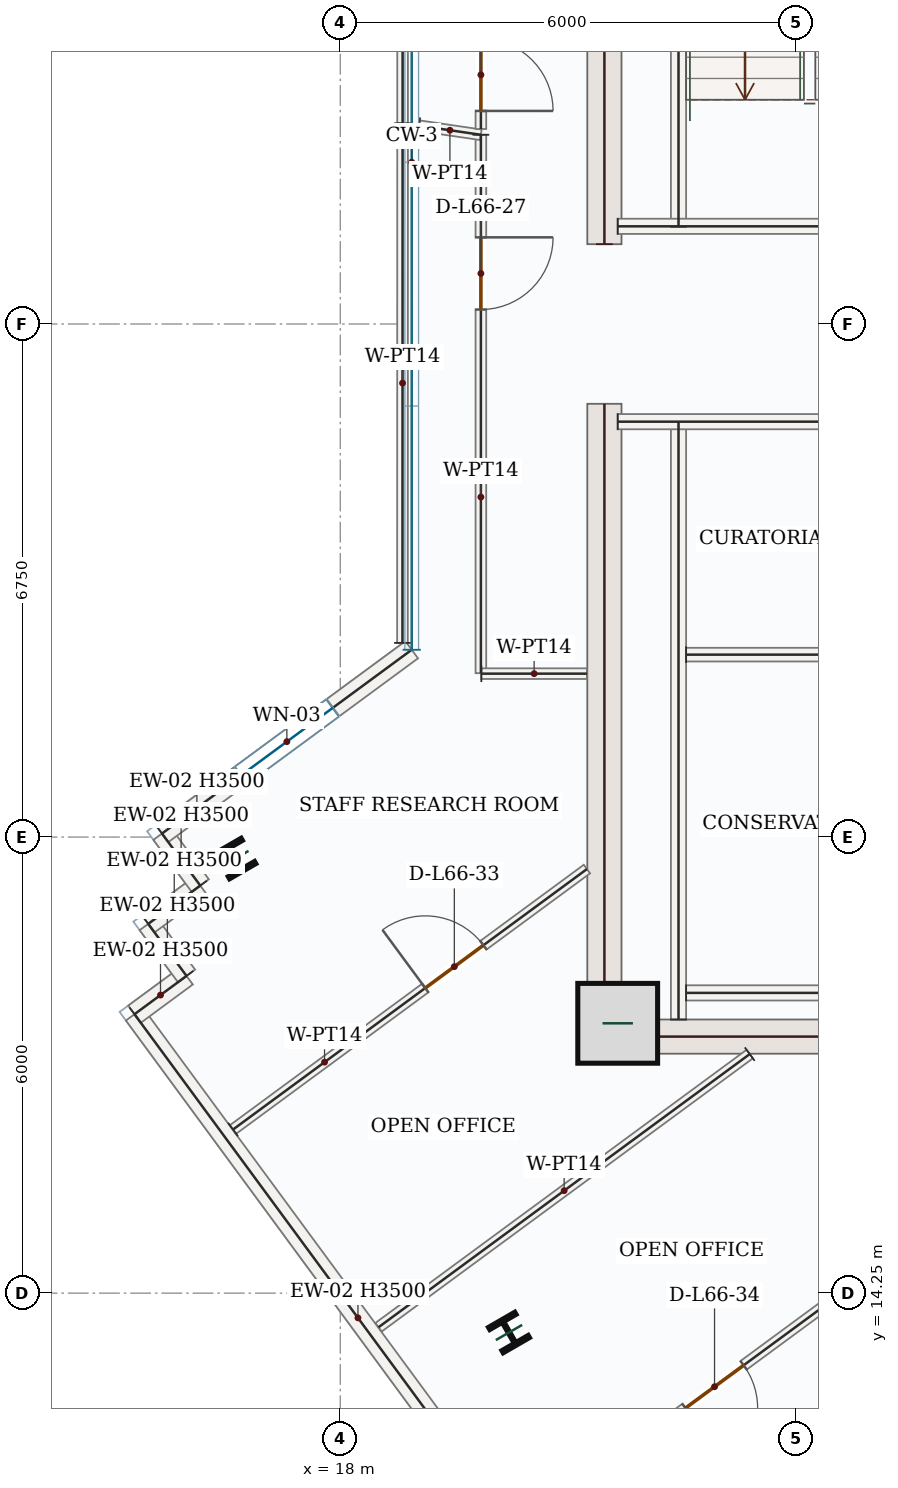
"""IFC4 building model, lengths in metres.
Left out: names, types, materials, properties, quantities, classifications, styles, units other than length and angle.
Written with IfcOpenShell. Run it as: python <this file> out.ifc"""

import sys

from ifc_helpers import new_model, si_unit, direction, frame, frame_2d, origin, origin_2d, place, context, subcontext, project, spatial, rectangle, i_section, extrude, source, transform, mapped, element, fill, save


model = new_model("IFC4")
c1 = context("Model", 3, precision=1e-05, world=origin(), true_north=direction((0.0, 1.0)))
c2 = subcontext(c1, "Body", "Model", "MODEL_VIEW")
j1 = project(units=[si_unit("LENGTHUNIT", "METRE"), si_unit("PLANEANGLEUNIT", "RADIAN")], contexts=[c1])
p1 = place(None, origin())
s1 = spatial("IfcSite", under=j1, at=p1, CompositionType="ELEMENT")
p2 = place(p1, origin())
s2 = spatial("IfcBuilding", under=s1, at=p2, CompositionType="ELEMENT")
p3 = place(p2, frame((0.0, 0.0, 276.6)))
s3 = spatial("IfcBuildingStorey", under=s2, at=p3, CompositionType="ELEMENT", Elevation=276.6)
m1 = source(origin(), c2, "Body", "SweptSolid", [
    extrude(rectangle(XDim=8.55, YDim=0.45, at=frame_2d((4.275, 0.0))), origin(), (0.0, 0.0, 1.0), 3.5),
])
for number, where, z_axis, x_axis in (
    (1, (21.475, 17.4, 0.0), (0.0, 0.0, 1.0), (0.0, 1.0, 0.0)),
    (2, (21.475, 28.05, 0.0), (0.0, 0.0, 1.0), (0.0, 1.0, 0.0)),
):
    element("IfcWall", number, at=place(p3, frame(where, z_axis=z_axis, x_axis=x_axis)), inside=s3, PredefinedType="SHEAR", context=c2, shape_type="MappedRepresentation", body=[
        mapped(m1, transform((0.0, 0.0, 0.0), x_axis=(1.0, 0.0, 0.0), y_axis=(0.0, 1.0, 0.0), z_axis=(0.0, 0.0, 1.0), scale=1.0)),
    ])
m2 = source(origin(), c2, "Body", "SweptSolid", [
    extrude(rectangle(XDim=7.1, YDim=0.45, at=frame_2d((3.55, 0.0))), origin(), (0.0, 0.0, 1.0), 3.5),
])
p4 = place(p3, frame((21.7, 17.625, 0.0), z_axis=(0.0, 0.0, 1.0), x_axis=(1.0, 0.0, 0.0)))
e3 = element("IfcWall", 3, at=p4, inside=s3, PredefinedType="SHEAR", context=c2, shape_type="MappedRepresentation", body=[
    mapped(m2, transform((0.0, 0.0, 0.0), x_axis=(1.0, 0.0, 0.0), y_axis=(0.0, 1.0, 0.0), z_axis=(0.0, 0.0, 1.0), scale=1.0)),
])
m3 = source(origin(), c2, "Body", "SweptSolid", [
    extrude(rectangle(XDim=1.05, YDim=1.05, at=origin_2d()), origin(), (0.0, 0.0, 1.0), 3.75),
])
p5 = place(p3, frame((21.65, 17.8, 0.0), z_axis=(0.0, 0.0, 1.0), x_axis=(1.0, 0.0, 0.0)))
e4 = element("IfcColumn", 4, at=p5, inside=s3, PredefinedType="COLUMN", context=c2, shape_type="MappedRepresentation", body=[
    mapped(m3, transform((0.0, 0.0, 0.0), x_axis=(1.0, 0.0, 0.0), y_axis=(0.0, 1.0, 0.0), z_axis=(0.0, 0.0, 1.0), scale=1.0)),
])
m4 = source(origin(), c2, "Body", "SweptSolid", [
    extrude(i_section(OverallWidth=0.399, OverallDepth=0.386, WebThickness=0.021, FlangeThickness=0.033, FilletRadius=0.018, at=origin_2d()), origin(), (0.0, 0.0, 1.0), 3.75),
])
for number, where, z_axis, x_axis in (
    (5, (16.62, 19.968, 0.0), (0.0, 0.0, 1.0), (0.866, 0.5, 0.0)),
    (6, (20.22, 13.732, 0.0), (0.0, 0.0, 1.0), (0.866, 0.5, 0.0)),
):
    element("IfcColumn", number, at=place(p3, frame(where, z_axis=z_axis, x_axis=x_axis)), inside=s3, PredefinedType="COLUMN", context=c2, shape_type="MappedRepresentation", body=[
        mapped(m4, transform((0.0, 0.0, 0.0), x_axis=(1.0, 0.0, 0.0), y_axis=(0.0, 1.0, 0.0), z_axis=(0.0, 0.0, 1.0), scale=1.0)),
    ])
p6 = place(p3, frame((30.577, 14.74, 0.0), z_axis=(0.0, 0.0, 1.0), x_axis=(-0.805403112922, -0.592727446383, 0.0)))
e7 = element("IfcWall", 7, at=p6, inside=s3, PredefinedType="SOLIDWALL", context=c2, shape_type="SweptSolid", body=[
    extrude(rectangle(XDim=8.726, YDim=0.28, at=frame_2d((4.363, 0.0))), origin(), (0.0, 0.0, 1.0), 3.5),
])
p7 = place(p6, frame((3.613, 0.0, 0.85)))
e8 = element("IfcOpeningElement", 8, at=p7, cuts=e7, PredefinedType="OPENING", context=c2, shape_type="SweptSolid", body=[
    extrude(rectangle(XDim=1.5, YDim=1.5, at=frame_2d((0.75, 0.75))), frame((0.0, 0.15, 0.0), z_axis=(0.0, -1.0, 0.0), x_axis=(1.0, 0.0, 0.0)), (0.0, 0.0, 1.0), 0.3),
])
m5 = source(origin(), c2, "Body", "SweptSolid", [
    extrude(rectangle(XDim=9.92, YDim=0.28, at=frame_2d((4.96, 0.0))), origin(), (0.0, 0.0, 1.0), 3.5),
])
p8 = place(p3, frame((21.173, 9.93, 0.0), z_axis=(0.0, 0.0, 1.0), x_axis=(-0.592722097771, 0.805407049146, 0.0)))
e9 = element("IfcWall", 9, at=p8, inside=s3, PredefinedType="SOLIDWALL", context=c2, shape_type="MappedRepresentation", body=[
    mapped(m5, transform((0.0, 0.0, 0.0), x_axis=(1.0, 0.0, 0.0), y_axis=(0.0, 1.0, 0.0), z_axis=(0.0, 0.0, 1.0), scale=1.0)),
])
m6 = source(origin(), c2, "Body", "SweptSolid", [
    extrude(rectangle(XDim=0.85, YDim=0.28, at=frame_2d((0.425, 0.0))), origin(), (0.0, 0.0, 1.0), 3.5),
])
for number, where, z_axis, x_axis in (
    (10, (15.293, 17.919, 0.0), (0.0, 0.0, 1.0), (0.805, 0.593, 0.0)),
    (11, (15.977, 18.423, 0.0), (0.0, 0.0, 1.0), (-0.593, 0.805, 0.0)),
):
    element("IfcWall", number, at=place(p3, frame(where, z_axis=z_axis, x_axis=x_axis)), inside=s3, PredefinedType="SOLIDWALL", context=c2, shape_type="MappedRepresentation", body=[
        mapped(m6, transform((0.0, 0.0, 0.0), x_axis=(1.0, 0.0, 0.0), y_axis=(0.0, 1.0, 0.0), z_axis=(0.0, 0.0, 1.0), scale=1.0)),
    ])
m7 = source(origin(), c2, "Body", "SweptSolid", [
    extrude(rectangle(XDim=0.85, YDim=0.28, at=frame_2d((0.425, 0.0))), origin(), (0.0, 0.0, 1.0), 3.5),
])
p9 = place(p3, frame((15.473, 19.108, 0.0), z_axis=(0.0, 0.0, 1.0), x_axis=(0.805445398986, 0.592669983425, 0.0)))
e12 = element("IfcWall", 12, at=p9, inside=s3, PredefinedType="SOLIDWALL", context=c2, shape_type="MappedRepresentation", body=[
    mapped(m7, transform((0.0, 0.0, 0.0), x_axis=(1.0, 0.0, 0.0), y_axis=(0.0, 1.0, 0.0), z_axis=(0.0, 0.0, 1.0), scale=1.0)),
])
p10 = place(p3, frame((16.158, 19.612, 0.0), z_axis=(0.0, 0.0, 1.0), x_axis=(-0.592807079659, 0.80534450163, 0.0)))
e13 = element("IfcWall", 13, at=p10, inside=s3, PredefinedType="SOLIDWALL", context=c2, shape_type="MappedRepresentation", body=[
    mapped(m6, transform((0.0, 0.0, 0.0), x_axis=(1.0, 0.0, 0.0), y_axis=(0.0, 1.0, 0.0), z_axis=(0.0, 0.0, 1.0), scale=1.0)),
])
p11 = place(p3, frame((15.654, 20.296, 0.0), z_axis=(0.0, 0.0, 1.0), x_axis=(0.805410687764, 0.592717153486, 0.0)))
e14 = element("IfcWall", 14, at=p11, inside=s3, PredefinedType="SOLIDWALL", context=c2, shape_type="SweptSolid", body=[
    extrude(rectangle(XDim=4.079, YDim=0.28, at=frame_2d((2.04, 0.0))), origin(), (0.0, 0.0, 1.0), 3.5),
])
p12 = place(p11, frame((1.29, 0.0, 0.85)))
e15 = element("IfcOpeningElement", 15, at=p12, cuts=e14, PredefinedType="OPENING", context=c2, shape_type="SweptSolid", body=[
    extrude(rectangle(XDim=1.5, YDim=1.5, at=frame_2d((0.75, 0.75))), frame((0.0, 0.15, 0.0), z_axis=(0.0, -1.0, 0.0), x_axis=(1.0, 0.0, 0.0)), (0.0, 0.0, 1.0), 0.3),
])
m8 = source(origin(), c2, "Body", "SweptSolid", [
    extrude(rectangle(XDim=7.87, YDim=0.2, at=frame_2d((3.935, 0.0))), origin(), (0.0, 0.0, 1.0), 3.5),
])
for number, where, z_axis, x_axis in (
    (16, (22.45, 17.85, 0.0), (0.0, 0.0, 1.0), (0.0, 1.0, 0.0)),
    (17, (22.45, 28.28, 0.0), (0.0, 0.0, 1.0), (0.0, 1.0, 0.0)),
):
    element("IfcWall", number, at=place(p3, frame(where, z_axis=z_axis, x_axis=x_axis)), inside=s3, PredefinedType="SOLIDWALL", context=c2, shape_type="MappedRepresentation", body=[
        mapped(m8, transform((0.0, 0.0, 0.0), x_axis=(1.0, 0.0, 0.0), y_axis=(0.0, 1.0, 0.0), z_axis=(0.0, 0.0, 1.0), scale=1.0)),
    ])
m9 = source(origin(), c2, "Body", "SweptSolid", [
    extrude(rectangle(XDim=4.25, YDim=0.2, at=frame_2d((2.125, 0.0))), origin(), (0.0, 0.0, 1.0), 3.5),
])
for number, where, z_axis, x_axis in (
    (18, (21.65, 25.715, 0.0), (0.0, 0.0, 1.0), (1.0, 0.0, 0.0)),
    (19, (21.65, 28.285, 0.0), (0.0, 0.0, 1.0), (1.0, 0.0, 0.0)),
):
    element("IfcWall", number, at=place(p3, frame(where, z_axis=z_axis, x_axis=x_axis)), inside=s3, PredefinedType="SOLIDWALL", context=c2, shape_type="MappedRepresentation", body=[
        mapped(m9, transform((0.0, 0.0, 0.0), x_axis=(1.0, 0.0, 0.0), y_axis=(0.0, 1.0, 0.0), z_axis=(0.0, 0.0, 1.0), scale=1.0)),
    ])
m10 = source(origin(), c2, "Body", "SweptSolid", [
    extrude(rectangle(XDim=3.25, YDim=0.2, at=frame_2d((1.625, 0.0))), origin(), (0.0, 0.0, 1.0), 3.5),
])
p13 = place(p3, frame((22.55, 18.2, 0.0), z_axis=(0.0, 0.0, 1.0), x_axis=(1.0, 0.0, 0.0)))
e20 = element("IfcWall", 20, at=p13, inside=s3, PredefinedType="SOLIDWALL", context=c2, shape_type="MappedRepresentation", body=[
    mapped(m10, transform((0.0, 0.0, 0.0), x_axis=(1.0, 0.0, 0.0), y_axis=(0.0, 1.0, 0.0), z_axis=(0.0, 0.0, 1.0), scale=1.0)),
])
m11 = source(origin(), c2, "Body", "SweptSolid", [
    extrude(rectangle(XDim=3.25, YDim=0.18, at=frame_2d((1.625, 0.0))), origin(), (0.0, 0.0, 1.0), 3.5),
])
p14 = place(p3, frame((22.55, 22.65, 0.0), z_axis=(0.0, 0.0, 1.0), x_axis=(1.0, 0.0, 0.0)))
e21 = element("IfcWall", 21, at=p14, inside=s3, PredefinedType="PARTITIONING", context=c2, shape_type="MappedRepresentation", body=[
    mapped(m11, transform((0.0, 0.0, 0.0), x_axis=(1.0, 0.0, 0.0), y_axis=(0.0, 1.0, 0.0), z_axis=(0.0, 0.0, 1.0), scale=1.0)),
])
m12 = source(origin(), c2, "Body", "SweptSolid", [
    extrude(rectangle(XDim=6.063, YDim=0.14, at=frame_2d((3.032, 0.0))), origin(), (0.0, 0.0, 1.0), 3.5),
])
p15 = place(p3, frame((23.387, 17.395, 0.0), z_axis=(0.0, 0.0, 1.0), x_axis=(-0.805422045282, -0.59270172007, 0.0)))
e22 = element("IfcWall", 22, at=p15, inside=s3, PredefinedType="PARTITIONING", context=c2, shape_type="MappedRepresentation", body=[
    mapped(m12, transform((0.0, 0.0, 0.0), x_axis=(1.0, 0.0, 0.0), y_axis=(0.0, 1.0, 0.0), z_axis=(0.0, 0.0, 1.0), scale=1.0)),
])
p16 = place(p3, frame((16.589, 16.403, 0.0), z_axis=(0.0, 0.0, 1.0), x_axis=(0.80540492624, 0.592724982423, 0.0)))
e23 = element("IfcWall", 23, at=p16, inside=s3, PredefinedType="PARTITIONING", context=c2, shape_type="SweptSolid", body=[
    extrude(rectangle(XDim=5.781, YDim=0.14, at=frame_2d((2.891, 0.0))), origin(), (0.0, 0.0, 1.0), 3.5),
])
p17 = place(p16, frame((3.14, 0.0, 0.0)))
e24 = element("IfcOpeningElement", 24, at=p17, cuts=e23, PredefinedType="OPENING", context=c2, shape_type="SweptSolid", body=[
    extrude(rectangle(XDim=0.95, YDim=2.15, at=frame_2d((0.475, 1.075))), frame((0.0, 0.08, 0.0), z_axis=(0.0, -1.0, 0.0), x_axis=(1.0, 0.0, 0.0)), (0.0, 0.0, 1.0), 0.16),
])
p18 = place(p3, frame((25.418, 14.854, 0.0), z_axis=(0.0, 0.0, 1.0), x_axis=(-0.805402487917, -0.592728295645, 0.0)))
e25 = element("IfcWall", 25, at=p18, inside=s3, PredefinedType="PARTITIONING", context=c2, shape_type="SweptSolid", body=[
    extrude(rectangle(XDim=6.193, YDim=0.14, at=frame_2d((3.097, 0.0))), origin(), (0.0, 0.0, 1.0), 3.5),
])
p19 = place(p18, frame((2.622, 0.0, 0.0)))
e26 = element("IfcOpeningElement", 26, at=p19, cuts=e25, PredefinedType="OPENING", context=c2, shape_type="SweptSolid", body=[
    extrude(rectangle(XDim=0.95, YDim=2.15, at=frame_2d((0.475, 1.075))), frame((0.0, 0.08, 0.0), z_axis=(0.0, -1.0, 0.0), x_axis=(1.0, 0.0, 0.0)), (0.0, 0.0, 1.0), 0.16),
])
p20 = place(p3, frame((19.85, 29.49, 0.0), z_axis=(0.0, 0.0, 1.0), x_axis=(0.0, -1.0, 0.0)))
e27 = element("IfcWall", 27, at=p20, inside=s3, PredefinedType="PARTITIONING", context=c2, shape_type="SweptSolid", body=[
    extrude(rectangle(XDim=7.083, YDim=0.14, at=frame_2d((3.542, 0.0))), origin(), (0.0, 0.0, 1.0), 3.5),
])
p21 = place(p20, frame((1.349, 0.0, 0.0)))
e28 = element("IfcOpeningElement", 28, at=p21, cuts=e27, PredefinedType="OPENING", context=c2, shape_type="SweptSolid", body=[
    extrude(rectangle(XDim=0.95, YDim=2.15, at=frame_2d((0.475, 1.075))), frame((0.0, 0.08, 0.0), z_axis=(0.0, -1.0, 0.0), x_axis=(1.0, 0.0, 0.0)), (0.0, 0.0, 1.0), 0.16),
])
m13 = source(origin(), c2, "Body", "SweptSolid", [
    extrude(rectangle(XDim=1.389, YDim=0.14, at=frame_2d((0.695, 0.0))), origin(), (0.0, 0.0, 1.0), 3.5),
])
p22 = place(p3, frame((19.856, 22.4, 0.0), z_axis=(0.0, 0.0, 1.0), x_axis=(1.0, 0.0, 0.0)))
e29 = element("IfcWall", 29, at=p22, inside=s3, PredefinedType="PARTITIONING", context=c2, shape_type="MappedRepresentation", body=[
    mapped(m13, transform((0.0, 0.0, 0.0), x_axis=(1.0, 0.0, 0.0), y_axis=(0.0, 1.0, 0.0), z_axis=(0.0, 0.0, 1.0), scale=1.0)),
])
m14 = source(origin(), c2, "Body", "SweptSolid", [
    extrude(rectangle(XDim=6.836, YDim=0.14, at=frame_2d((3.418, 0.0))), origin(), (0.0, 0.0, 1.0), 3.5),
])
p23 = place(p3, frame((18.818, 22.805, 0.0), z_axis=(0.0, 0.0, 1.0), x_axis=(0.000285724478, 0.999999959181, 0.0)))
e30 = element("IfcWall", 30, at=p23, inside=s3, PredefinedType="PARTITIONING", context=c2, shape_type="MappedRepresentation", body=[
    mapped(m14, transform((0.0, 0.0, 0.0), x_axis=(1.0, 0.0, 0.0), y_axis=(0.0, 1.0, 0.0), z_axis=(0.0, 0.0, 1.0), scale=1.0)),
])
m15 = source(origin(), c2, "Body", "SweptSolid", [
    extrude(rectangle(XDim=0.824, YDim=0.14, at=frame_2d((0.412, 0.0))), origin(), (0.0, 0.0, 1.0), 3.5),
])
p24 = place(p3, frame((19.035, 29.609, 0.0), z_axis=(0.0, 0.0, 1.0), x_axis=(0.989445525715, -0.144905319579, 0.0)))
e31 = element("IfcWall", 31, at=p24, inside=s3, PredefinedType="PARTITIONING", context=c2, shape_type="MappedRepresentation", body=[
    mapped(m15, transform((0.0, 0.0, 0.0), x_axis=(1.0, 0.0, 0.0), y_axis=(0.0, 1.0, 0.0), z_axis=(0.0, 0.0, 1.0), scale=1.0)),
])
p25 = place(p3, frame((19.851, 31.596, 0.0), z_axis=(0.0, 0.0, 1.0), x_axis=(-0.000240384608, -0.999999971108, 0.0)))
e32 = element("IfcWall", 32, at=p25, inside=s3, PredefinedType="PARTITIONING", context=c2, shape_type="SweptSolid", body=[
    extrude(rectangle(XDim=2.031, YDim=0.14, at=frame_2d((1.016, 0.0))), origin(), (0.0, 0.0, 1.0), 3.5),
])
p26 = place(p25, frame((0.844, 0.0, 0.0)))
e33 = element("IfcOpeningElement", 33, at=p26, cuts=e32, PredefinedType="OPENING", context=c2, shape_type="SweptSolid", body=[
    extrude(rectangle(XDim=0.95, YDim=2.15, at=frame_2d((0.475, 1.075))), frame((0.0, 0.08, 0.0), z_axis=(0.0, -1.0, 0.0), x_axis=(1.0, 0.0, 0.0)), (0.0, 0.0, 1.0), 0.16),
])
m16 = source(origin(), c2, "Body", "SweptSolid", [
    extrude(rectangle(XDim=5.951, YDim=0.14, at=frame_2d((2.976, 0.0))), origin(), (0.0, 0.0, 1.0), 3.5),
])
p27 = place(p3, frame((18.82, 29.64, 0.0), z_axis=(0.0, 0.0, 1.0), x_axis=(0.0, 1.0, 0.0)))
e34 = element("IfcWall", 34, at=p27, inside=s3, PredefinedType="PARTITIONING", context=c2, shape_type="MappedRepresentation", body=[
    mapped(m16, transform((0.0, 0.0, 0.0), x_axis=(1.0, 0.0, 0.0), y_axis=(0.0, 1.0, 0.0), z_axis=(0.0, 0.0, 1.0), scale=1.0)),
])
m17 = source(origin(), c2, "Body", "SweptSolid", [
    extrude(rectangle(XDim=1.5, YDim=1.5, at=frame_2d((0.75, 0.75))), frame((0.0, 0.03, 0.0), z_axis=(0.0, -1.0, 0.0), x_axis=(1.0, 0.0, 0.0)), (0.0, 0.0, 1.0), 0.06),
])
p28 = place(p12, origin())
e35 = element("IfcWindow", 35, at=p28, inside=s3, PartitioningType="SINGLE_PANEL", PredefinedType="WINDOW", context=c2, shape_type="MappedRepresentation", body=[
    mapped(m17, transform((0.0, 0.0, 0.0), x_axis=(1.0, 0.0, 0.0), y_axis=(0.0, 1.0, 0.0), z_axis=(0.0, 0.0, 1.0), scale=1.0)),
])
fill(e15, e35)
m18 = source(origin(), c2, "Body", "SweptSolid", [
    extrude(rectangle(XDim=0.95, YDim=2.15, at=frame_2d((0.475, 1.075))), frame((0.0, 0.025, 0.0), z_axis=(0.0, -1.0, 0.0), x_axis=(1.0, 0.0, 0.0)), (0.0, 0.0, 1.0), 0.05),
])
p29 = place(p26, origin())
e36 = element("IfcDoor", 36, at=p29, inside=s3, OperationType="SINGLE_SWING_RIGHT", PredefinedType="DOOR", context=c2, shape_type="MappedRepresentation", body=[
    mapped(m18, transform((0.0, 0.0, 0.0), x_axis=(1.0, 0.0, 0.0), y_axis=(0.0, 1.0, 0.0), z_axis=(0.0, 0.0, 1.0), scale=1.0)),
])
fill(e33, e36)
p30 = place(p21, origin())
e37 = element("IfcDoor", 37, at=p30, inside=s3, OperationType="SINGLE_SWING_LEFT", PredefinedType="DOOR", context=c2, shape_type="MappedRepresentation", body=[
    mapped(m18, transform((0.0, 0.0, 0.0), x_axis=(1.0, 0.0, 0.0), y_axis=(0.0, 1.0, 0.0), z_axis=(0.0, 0.0, 1.0), scale=1.0)),
])
fill(e28, e37)
p31 = place(p17, origin())
e38 = element("IfcDoor", 38, at=p31, inside=s3, OperationType="SINGLE_SWING_LEFT", PredefinedType="DOOR", context=c2, shape_type="MappedRepresentation", body=[
    mapped(m18, transform((0.0, 0.0, 0.0), x_axis=(1.0, 0.0, 0.0), y_axis=(0.0, 1.0, 0.0), z_axis=(0.0, 0.0, 1.0), scale=1.0)),
])
fill(e24, e38)
p32 = place(p19, origin())
e39 = element("IfcDoor", 39, at=p32, inside=s3, OperationType="SINGLE_SWING_RIGHT", PredefinedType="DOOR", context=c2, shape_type="MappedRepresentation", body=[
    mapped(m18, transform((0.0, 0.0, 0.0), x_axis=(1.0, 0.0, 0.0), y_axis=(0.0, 1.0, 0.0), z_axis=(0.0, 0.0, 1.0), scale=1.0)),
])
fill(e26, e39)
save(model, sys.argv[1])
